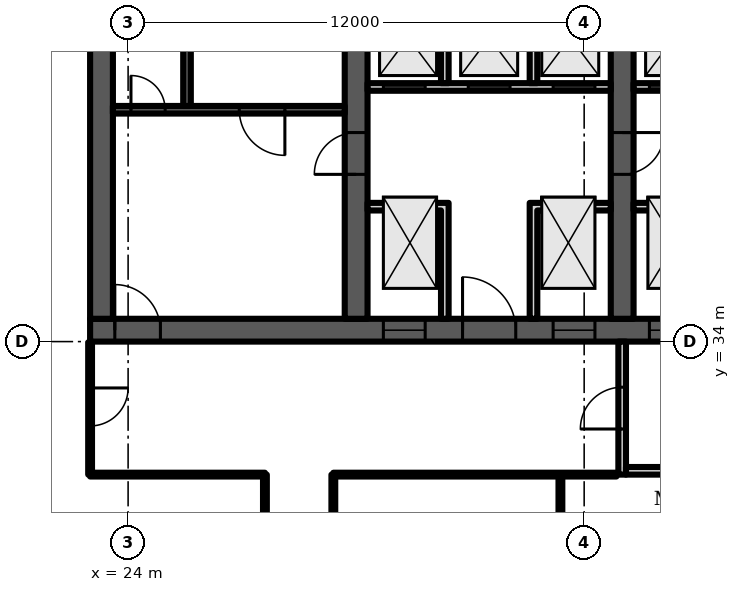
"""IFC4 building model, lengths in metres.
Left out: names, types, materials, properties, quantities, classifications, styles, units other than length and angle.
Written with IfcOpenShell. Run it as: python <this file> out.ifc"""

import sys

from ifc_helpers import new_model, si_unit, direction, frame, frame_2d, origin, place, context, subcontext, project, spatial, polyline, rectangle, outline, extrude, element, fill, save


model = new_model("IFC4")
c1 = context("Model", 3, precision=1e-05, world=origin(), true_north=direction((0.0, 1.0)))
c2 = subcontext(c1, "Body", "Model", "MODEL_VIEW")
j1 = project(units=[si_unit("LENGTHUNIT", "METRE"), si_unit("PLANEANGLEUNIT", "RADIAN")], contexts=[c1])
p1 = place(None, origin())
s1 = spatial("IfcSite", under=j1, at=p1, CompositionType="ELEMENT")
p2 = place(p1, origin())
s2 = spatial("IfcBuilding", under=s1, at=p2, CompositionType="ELEMENT")
p3 = place(p2, frame((0.0, 0.0, 207.1)))
s3 = spatial("IfcBuildingStorey", under=s2, at=p3, CompositionType="ELEMENT", Elevation=207.1)
p4 = place(p3, frame((23.0, 34.3, 0.0), z_axis=(0.0, 0.0, 1.0), x_axis=(1.0, 0.0, 0.0)))
e1 = element("IfcWall", 1, at=p4, inside=s3, PredefinedType="SHEAR", context=c2, shape_type="SweptSolid", body=[
    extrude(rectangle(XDim=35.0, YDim=0.6, at=frame_2d((17.5, 0.0))), origin(), (0.0, 0.0, 1.0), 3.6),
])
p5 = place(p4, frame((0.65, 0.0, 0.0)))
e2 = element("IfcOpeningElement", 2, at=p5, cuts=e1, PredefinedType="OPENING", context=c2, shape_type="SweptSolid", body=[
    extrude(rectangle(XDim=1.2, YDim=2.1, at=frame_2d((0.6, 1.05))), frame((0.0, 0.31, 0.0), z_axis=(0.0, -1.0, 0.0), x_axis=(1.0, 0.0, 0.0)), (0.0, 0.0, 1.0), 0.62),
])
p6 = place(p4, frame((7.717, 0.0, 0.0)))
e3 = element("IfcOpeningElement", 3, at=p6, cuts=e1, PredefinedType="OPENING", context=c2, shape_type="SweptSolid", body=[
    extrude(rectangle(XDim=1.1, YDim=2.1, at=frame_2d((0.55, 1.05))), frame((0.0, 0.31, 0.0), z_axis=(0.0, -1.0, 0.0), x_axis=(1.0, 0.0, 0.0)), (0.0, 0.0, 1.0), 0.62),
])
p7 = place(p4, frame((12.183, 0.0, 0.0)))
e4 = element("IfcOpeningElement", 4, at=p7, cuts=e1, PredefinedType="OPENING", context=c2, shape_type="SweptSolid", body=[
    extrude(rectangle(XDim=1.1, YDim=2.1, at=frame_2d((0.55, 1.05))), frame((0.0, 0.31, 0.0), z_axis=(0.0, -1.0, 0.0), x_axis=(1.0, 0.0, 0.0)), (0.0, 0.0, 1.0), 0.62),
])
p8 = place(p4, frame((9.8, 0.0, 0.0)))
e5 = element("IfcOpeningElement", 5, at=p8, cuts=e1, PredefinedType="OPENING", context=c2, shape_type="SweptSolid", body=[
    extrude(rectangle(XDim=1.4, YDim=2.1, at=frame_2d((0.7, 1.05))), frame((0.0, 0.31, 0.0), z_axis=(0.0, -1.0, 0.0), x_axis=(1.0, 0.0, 0.0)), (0.0, 0.0, 1.0), 0.62),
])
p9 = place(p4, frame((14.717, 0.0, 0.0)))
e6 = element("IfcOpeningElement", 6, at=p9, cuts=e1, PredefinedType="OPENING", context=c2, shape_type="SweptSolid", body=[
    extrude(rectangle(XDim=1.1, YDim=2.1, at=frame_2d((0.55, 1.05))), frame((0.0, 0.31, 0.0), z_axis=(0.0, -1.0, 0.0), x_axis=(1.0, 0.0, 0.0)), (0.0, 0.0, 1.0), 0.62),
])
p10 = place(p4, frame((16.95, 0.0, 0.0)))
e7 = element("IfcOpeningElement", 7, at=p10, cuts=e1, PredefinedType="OPENING", context=c2, shape_type="SweptSolid", body=[
    extrude(rectangle(XDim=1.1, YDim=2.1, at=frame_2d((0.55, 1.05))), frame((0.0, 0.31, 0.0), z_axis=(0.0, -1.0, 0.0), x_axis=(1.0, 0.0, 0.0)), (0.0, 0.0, 1.0), 0.62),
])
p11 = place(p4, frame((19.183, 0.0, 0.0)))
e8 = element("IfcOpeningElement", 8, at=p11, cuts=e1, PredefinedType="OPENING", context=c2, shape_type="SweptSolid", body=[
    extrude(rectangle(XDim=1.1, YDim=2.1, at=frame_2d((0.55, 1.05))), frame((0.0, 0.31, 0.0), z_axis=(0.0, -1.0, 0.0), x_axis=(1.0, 0.0, 0.0)), (0.0, 0.0, 1.0), 0.62),
])
p12 = place(p4, frame((26.15, 0.0, 0.0)))
e9 = element("IfcOpeningElement", 9, at=p12, cuts=e1, PredefinedType="OPENING", context=c2, shape_type="SweptSolid", body=[
    extrude(rectangle(XDim=1.2, YDim=2.1, at=frame_2d((0.6, 1.05))), frame((0.0, 0.31, 0.0), z_axis=(0.0, -1.0, 0.0), x_axis=(1.0, 0.0, 0.0)), (0.0, 0.0, 1.0), 0.62),
])
p13 = place(p4, frame((28.767, 0.0, 0.0)))
e10 = element("IfcOpeningElement", 10, at=p13, cuts=e1, PredefinedType="OPENING", context=c2, shape_type="SweptSolid", body=[
    extrude(rectangle(XDim=1.0, YDim=2.1, at=frame_2d((0.5, 1.05))), frame((0.0, 0.31, 0.0), z_axis=(0.0, -1.0, 0.0), x_axis=(1.0, 0.0, 0.0)), (0.0, 0.0, 1.0), 0.62),
])
p14 = place(p4, frame((33.083, 0.0, 0.0)))
e11 = element("IfcOpeningElement", 11, at=p14, cuts=e1, PredefinedType="OPENING", context=c2, shape_type="SweptSolid", body=[
    extrude(rectangle(XDim=1.0, YDim=2.1, at=frame_2d((0.5, 1.05))), frame((0.0, 0.31, 0.0), z_axis=(0.0, -1.0, 0.0), x_axis=(1.0, 0.0, 0.0)), (0.0, 0.0, 1.0), 0.62),
])
p15 = place(p4, frame((30.8, 0.0, 0.0)))
e12 = element("IfcOpeningElement", 12, at=p15, cuts=e1, PredefinedType="OPENING", context=c2, shape_type="SweptSolid", body=[
    extrude(rectangle(XDim=1.4, YDim=2.1, at=frame_2d((0.7, 1.05))), frame((0.0, 0.31, 0.0), z_axis=(0.0, -1.0, 0.0), x_axis=(1.0, 0.0, 0.0)), (0.0, 0.0, 1.0), 0.62),
])
p16 = place(p3, frame((23.3, 34.6, 0.0), z_axis=(0.0, 0.0, 1.0), x_axis=(0.0, 1.0, 0.0)))
e13 = element("IfcWall", 13, at=p16, inside=s3, PredefinedType="SHEAR", context=c2, shape_type="SweptSolid", body=[
    extrude(rectangle(XDim=13.585, YDim=0.6, at=frame_2d((6.792, 0.0))), origin(), (0.0, 0.0, 1.0), 3.6),
])
p17 = place(p3, frame((30.0, 34.6, 0.0), z_axis=(0.0, 0.0, 1.0), x_axis=(0.0, 1.0, 0.0)))
e14 = element("IfcWall", 14, at=p17, inside=s3, PredefinedType="SHEAR", context=c2, shape_type="SweptSolid", body=[
    extrude(rectangle(XDim=14.171, YDim=0.6, at=frame_2d((7.085, 0.0))), origin(), (0.0, 0.0, 1.0), 3.6),
])
p18 = place(p17, frame((3.8, 0.0, 0.0)))
e15 = element("IfcOpeningElement", 15, at=p18, cuts=e14, PredefinedType="OPENING", context=c2, shape_type="SweptSolid", body=[
    extrude(rectangle(XDim=1.1, YDim=2.1, at=frame_2d((0.55, 1.05))), frame((0.0, 0.31, 0.0), z_axis=(0.0, -1.0, 0.0), x_axis=(1.0, 0.0, 0.0)), (0.0, 0.0, 1.0), 0.62),
])
p19 = place(p3, frame((37.0, 34.6, 0.0), z_axis=(0.0, 0.0, 1.0), x_axis=(0.0, 1.0, 0.0)))
e16 = element("IfcWall", 16, at=p19, inside=s3, PredefinedType="SHEAR", context=c2, shape_type="SweptSolid", body=[
    extrude(rectangle(XDim=14.784, YDim=0.6, at=frame_2d((7.392, 0.0))), origin(), (0.0, 0.0, 1.0), 3.6),
])
p20 = place(p19, frame((11.302, 0.0, 0.0)))
e17 = element("IfcOpeningElement", 17, at=p20, cuts=e16, PredefinedType="OPENING", context=c2, shape_type="SweptSolid", body=[
    extrude(rectangle(XDim=1.0, YDim=2.1, at=frame_2d((0.5, 1.05))), frame((0.0, 0.31, 0.0), z_axis=(0.0, -1.0, 0.0), x_axis=(1.0, 0.0, 0.0)), (0.0, 0.0, 1.0), 0.62),
])
p21 = place(p19, frame((3.8, 0.0, 0.0)))
e18 = element("IfcOpeningElement", 18, at=p21, cuts=e16, PredefinedType="OPENING", context=c2, shape_type="SweptSolid", body=[
    extrude(rectangle(XDim=1.1, YDim=2.1, at=frame_2d((0.55, 1.05))), frame((0.0, 0.31, 0.0), z_axis=(0.0, -1.0, 0.0), x_axis=(1.0, 0.0, 0.0)), (0.0, 0.0, 1.0), 0.62),
])
p22 = place(p3, frame((23.6, 40.1, 0.0), z_axis=(0.0, 0.0, 1.0), x_axis=(1.0, 0.0, 0.0)))
e19 = element("IfcWall", 19, at=p22, inside=s3, PredefinedType="SHEAR", context=c2, shape_type="SweptSolid", body=[
    extrude(rectangle(XDim=6.1, YDim=0.2, at=frame_2d((3.05, 0.0))), origin(), (0.0, 0.0, 1.0), 3.2),
])
p23 = place(p22, frame((3.325, 0.0, 0.0)))
e20 = element("IfcOpeningElement", 20, at=p23, cuts=e19, PredefinedType="OPENING", context=c2, shape_type="SweptSolid", body=[
    extrude(rectangle(XDim=1.2, YDim=2.1, at=frame_2d((0.6, 1.05))), frame((0.0, 0.11, 0.0), z_axis=(0.0, -1.0, 0.0), x_axis=(1.0, 0.0, 0.0)), (0.0, 0.0, 1.0), 0.22),
])
p24 = place(p22, frame((0.475, 0.0, 0.0)))
e21 = element("IfcOpeningElement", 21, at=p24, cuts=e19, PredefinedType="OPENING", context=c2, shape_type="SweptSolid", body=[
    extrude(rectangle(XDim=0.9, YDim=2.1, at=frame_2d((0.45, 1.05))), frame((0.0, 0.11, 0.0), z_axis=(0.0, -1.0, 0.0), x_axis=(1.0, 0.0, 0.0)), (0.0, 0.0, 1.0), 0.22),
])
p25 = place(p3, frame((25.55, 40.2, 0.0), z_axis=(0.0, 0.0, 1.0), x_axis=(0.0, 1.0, 0.0)))
e22 = element("IfcWall", 22, at=p25, inside=s3, PredefinedType="SHEAR", context=c2, shape_type="SweptSolid", body=[
    extrude(rectangle(XDim=7.2, YDim=0.2, at=frame_2d((3.6, 0.0))), origin(), (0.0, 0.0, 1.0), 3.2),
])
p26 = place(p3, frame((30.3, 40.7, 0.0), z_axis=(0.0, 0.0, 1.0), x_axis=(1.0, 0.0, 0.0)))
e23 = element("IfcWall", 23, at=p26, inside=s3, PredefinedType="PARTITIONING", context=c2, shape_type="SweptSolid", body=[
    extrude(rectangle(XDim=6.4, YDim=0.2, at=frame_2d((3.2, 0.0))), origin(), (0.0, 0.0, 1.0), 3.2),
])
p27 = place(p26, frame((0.417, 0.0, 0.0)))
e24 = element("IfcOpeningElement", 24, at=p27, cuts=e23, PredefinedType="OPENING", context=c2, shape_type="SweptSolid", body=[
    extrude(rectangle(XDim=1.1, YDim=2.1, at=frame_2d((0.55, 1.05))), frame((0.0, 0.11, 0.0), z_axis=(0.0, -1.0, 0.0), x_axis=(1.0, 0.0, 0.0)), (0.0, 0.0, 1.0), 0.22),
])
p28 = place(p26, frame((2.65, 0.0, 0.0)))
e25 = element("IfcOpeningElement", 25, at=p28, cuts=e23, PredefinedType="OPENING", context=c2, shape_type="SweptSolid", body=[
    extrude(rectangle(XDim=1.1, YDim=2.1, at=frame_2d((0.55, 1.05))), frame((0.0, 0.11, 0.0), z_axis=(0.0, -1.0, 0.0), x_axis=(1.0, 0.0, 0.0)), (0.0, 0.0, 1.0), 0.22),
])
p29 = place(p26, frame((4.883, 0.0, 0.0)))
e26 = element("IfcOpeningElement", 26, at=p29, cuts=e23, PredefinedType="OPENING", context=c2, shape_type="SweptSolid", body=[
    extrude(rectangle(XDim=1.1, YDim=2.1, at=frame_2d((0.55, 1.05))), frame((0.0, 0.11, 0.0), z_axis=(0.0, -1.0, 0.0), x_axis=(1.0, 0.0, 0.0)), (0.0, 0.0, 1.0), 0.22),
])
p30 = place(p3, frame((0.0, 0.0, -0.0)))
e27 = element("IfcWall", 27, at=p30, inside=s3, PredefinedType="PARTITIONING", context=c2, shape_type="SweptSolid", body=[
    extrude(outline(polyline([(32.233, 37.45), (30.3, 37.45), (30.3, 37.65), (32.233, 37.65), (32.433, 37.65), (32.433, 34.6), (32.233, 34.6), (32.233, 37.45)])), origin(), (0.0, 0.0, 1.0), 3.2),
])
p31 = place(p3, frame((0.0, 0.0, -0.0)))
e28 = element("IfcWall", 28, at=p31, inside=s3, PredefinedType="PARTITIONING", context=c2, shape_type="SweptSolid", body=[
    extrude(outline(polyline([(34.567, 37.65), (34.767, 37.65), (36.7, 37.65), (36.7, 37.45), (34.767, 37.45), (34.767, 34.6), (34.567, 34.6), (34.567, 37.65)])), origin(), (0.0, 0.0, 1.0), 3.2),
])
p32 = place(p3, frame((0.0, 0.0, -0.0)))
e29 = element("IfcWall", 29, at=p32, inside=s3, PredefinedType="PARTITIONING", context=c2, shape_type="SweptSolid", body=[
    extrude(outline(polyline([(32.433, 40.8), (32.233, 40.8), (32.233, 43.8), (30.3, 43.8), (30.3, 44.0), (36.7, 44.0), (36.7, 43.8), (34.767, 43.8), (34.767, 40.8), (34.567, 40.8), (34.567, 43.8), (32.433, 43.8), (32.433, 40.8)])), origin(), (0.0, 0.0, 1.0), 3.2),
])
p33 = place(p3, frame((37.3, 40.7, 0.0), z_axis=(0.0, 0.0, 1.0), x_axis=(1.0, 0.0, 0.0)))
e30 = element("IfcWall", 30, at=p33, inside=s3, PredefinedType="PARTITIONING", context=c2, shape_type="SweptSolid", body=[
    extrude(rectangle(XDim=6.4, YDim=0.2, at=frame_2d((3.2, 0.0))), origin(), (0.0, 0.0, 1.0), 3.2),
])
p34 = place(p33, frame((0.417, 0.0, 0.0)))
e31 = element("IfcOpeningElement", 31, at=p34, cuts=e30, PredefinedType="OPENING", context=c2, shape_type="SweptSolid", body=[
    extrude(rectangle(XDim=1.1, YDim=2.1, at=frame_2d((0.55, 1.05))), frame((0.0, 0.11, 0.0), z_axis=(0.0, -1.0, 0.0), x_axis=(1.0, 0.0, 0.0)), (0.0, 0.0, 1.0), 0.22),
])
p35 = place(p33, frame((2.65, 0.0, 0.0)))
e32 = element("IfcOpeningElement", 32, at=p35, cuts=e30, PredefinedType="OPENING", context=c2, shape_type="SweptSolid", body=[
    extrude(rectangle(XDim=1.1, YDim=2.1, at=frame_2d((0.55, 1.05))), frame((0.0, 0.11, 0.0), z_axis=(0.0, -1.0, 0.0), x_axis=(1.0, 0.0, 0.0)), (0.0, 0.0, 1.0), 0.22),
])
p36 = place(p33, frame((4.883, 0.0, 0.0)))
e33 = element("IfcOpeningElement", 33, at=p36, cuts=e30, PredefinedType="OPENING", context=c2, shape_type="SweptSolid", body=[
    extrude(rectangle(XDim=1.1, YDim=2.1, at=frame_2d((0.55, 1.05))), frame((0.0, 0.11, 0.0), z_axis=(0.0, -1.0, 0.0), x_axis=(1.0, 0.0, 0.0)), (0.0, 0.0, 1.0), 0.22),
])
p37 = place(p3, frame((0.0, 0.0, -0.0)))
e34 = element("IfcWall", 34, at=p37, inside=s3, PredefinedType="PARTITIONING", context=c2, shape_type="SweptSolid", body=[
    extrude(outline(polyline([(41.567, 37.1), (39.433, 37.1), (39.433, 34.6), (39.233, 34.6), (39.233, 37.45), (37.3, 37.45), (37.3, 37.65), (39.233, 37.65), (39.433, 37.65), (39.433, 37.3), (41.567, 37.3), (41.567, 37.35), (41.767, 37.35), (43.7, 37.35), (43.7, 37.15), (41.767, 37.15), (41.767, 34.6), (41.567, 34.6), (41.567, 37.1)])), origin(), (0.0, 0.0, 1.0), 3.2),
])
p38 = place(p3, frame((0.0, 0.0, -0.0)))
e35 = element("IfcWall", 35, at=p38, inside=s3, PredefinedType="PARTITIONING", context=c2, shape_type="SweptSolid", body=[
    extrude(outline(polyline([(39.433, 40.8), (39.233, 40.8), (39.233, 43.8), (37.3, 43.8), (37.3, 44.0), (43.7, 44.0), (43.7, 43.8), (41.767, 43.8), (41.767, 40.8), (41.567, 40.8), (41.567, 43.8), (39.433, 43.8), (39.433, 40.8)])), origin(), (0.0, 0.0, 1.0), 3.2),
])
p39 = place(p3, frame((37.0, 30.5, 0.0), z_axis=(0.0, 0.0, 1.0), x_axis=(0.0, 1.0, 0.0)))
e36 = element("IfcWall", 36, at=p39, inside=s3, PredefinedType="PARTITIONING", context=c2, shape_type="SweptSolid", body=[
    extrude(rectangle(XDim=3.5, YDim=0.2, at=frame_2d((1.75, 0.0))), origin(), (0.0, 0.0, 1.0), 3.2),
])
p40 = place(p39, frame((1.2, 0.0, 0.0)))
e37 = element("IfcOpeningElement", 37, at=p40, cuts=e36, PredefinedType="OPENING", context=c2, shape_type="SweptSolid", body=[
    extrude(rectangle(XDim=1.1, YDim=2.1, at=frame_2d((0.55, 1.05))), frame((0.0, 0.11, 0.0), z_axis=(0.0, -1.0, 0.0), x_axis=(1.0, 0.0, 0.0)), (0.0, 0.0, 1.0), 0.22),
])
p41 = place(p3, frame((37.1, 30.6, 0.0), z_axis=(0.0, 0.0, 1.0), x_axis=(1.0, 0.0, 0.0)))
e38 = element("IfcWall", 38, at=p41, inside=s3, PredefinedType="PARTITIONING", context=c2, shape_type="SweptSolid", body=[
    extrude(rectangle(XDim=2.8, YDim=0.2, at=frame_2d((1.4, 0.0))), origin(), (0.0, 0.0, 1.0), 3.2),
])
p42 = place(p3, frame((23.0, 30.5, 0.0), z_axis=(0.0, 0.0, 1.0), x_axis=(0.0, 1.0, 0.0)))
e39 = element("IfcWall", 39, at=p42, inside=s3, PredefinedType="PARTITIONING", context=c2, shape_type="SweptSolid", body=[
    extrude(rectangle(XDim=3.48, YDim=0.1, at=frame_2d((1.74, 0.0))), origin(), (0.0, 0.0, 1.0), 3.2),
])
p43 = place(p42, frame((1.28, 0.0, 0.0)))
e40 = element("IfcOpeningElement", 40, at=p43, cuts=e39, PredefinedType="OPENING", context=c2, shape_type="SweptSolid", body=[
    extrude(rectangle(XDim=1.0, YDim=2.1, at=frame_2d((0.5, 1.05))), frame((0.0, 0.06, 0.0), z_axis=(0.0, -1.0, 0.0), x_axis=(1.0, 0.0, 0.0)), (0.0, 0.0, 1.0), 0.12),
])
p44 = place(p3, frame((23.0, 30.5, 0.0), z_axis=(0.0, 0.0, 1.0), x_axis=(1.0, 0.0, 0.0)))
e41 = element("IfcWall", 41, at=p44, inside=s3, PredefinedType="PARTITIONING", context=c2, shape_type="SweptSolid", body=[
    extrude(rectangle(XDim=4.6, YDim=0.1, at=frame_2d((2.3, 0.0))), origin(), (0.0, 0.0, 1.0), 3.2),
])
p45 = place(p3, frame((27.6, 23.9, 0.0), z_axis=(0.0, 0.0, 1.0), x_axis=(0.0, 1.0, 0.0)))
e42 = element("IfcWall", 42, at=p45, inside=s3, PredefinedType="PARTITIONING", context=c2, shape_type="SweptSolid", body=[
    extrude(rectangle(XDim=6.6, YDim=0.1, at=frame_2d((3.3, 0.0))), origin(), (0.0, 0.0, 1.0), 3.2),
])
p46 = place(p3, frame((29.4, 22.1, 0.0), z_axis=(0.0, 0.0, 1.0), x_axis=(0.0, 1.0, 0.0)))
e43 = element("IfcWall", 43, at=p46, inside=s3, PredefinedType="PARTITIONING", context=c2, shape_type="SweptSolid", body=[
    extrude(rectangle(XDim=8.4, YDim=0.1, at=frame_2d((4.2, 0.0))), origin(), (0.0, 0.0, 1.0), 3.2),
])
p47 = place(p3, frame((29.4, 30.5, 0.0), z_axis=(0.0, 0.0, 1.0), x_axis=(1.0, 0.0, 0.0)))
e44 = element("IfcWall", 44, at=p47, inside=s3, PredefinedType="PARTITIONING", context=c2, shape_type="SweptSolid", body=[
    extrude(rectangle(XDim=7.45, YDim=0.1, at=frame_2d((3.725, 0.0))), origin(), (0.0, 0.0, 1.0), 3.2),
])
p48 = place(p3, frame((35.375, 19.205, 0.0), z_axis=(0.0, 0.0, 1.0), x_axis=(0.0, 1.0, 0.0)))
e45 = element("IfcWall", 45, at=p48, inside=s3, PredefinedType="PARTITIONING", context=c2, shape_type="SweptSolid", body=[
    extrude(rectangle(XDim=11.295, YDim=0.1, at=frame_2d((5.647, 0.0))), origin(), (0.0, 0.0, 1.0), 3.2),
])
p49 = place(p23, origin())
e46 = element("IfcDoor", 46, at=p49, inside=s3, OperationType="SINGLE_SWING_RIGHT", PredefinedType="DOOR", context=c2, shape_type="SweptSolid", body=[
    extrude(rectangle(XDim=1.2, YDim=2.1, at=frame_2d((0.6, 1.05))), frame((0.0, 0.025, 0.0), z_axis=(0.0, -1.0, 0.0), x_axis=(1.0, 0.0, 0.0)), (0.0, 0.0, 1.0), 0.05),
])
fill(e20, e46)
p50 = place(p24, origin())
e47 = element("IfcDoor", 47, at=p50, inside=s3, OperationType="SINGLE_SWING_LEFT", PredefinedType="DOOR", context=c2, shape_type="SweptSolid", body=[
    extrude(rectangle(XDim=0.9, YDim=2.1, at=frame_2d((0.45, 1.05))), frame((0.0, 0.025, 0.0), z_axis=(0.0, -1.0, 0.0), x_axis=(1.0, 0.0, 0.0)), (0.0, 0.0, 1.0), 0.05),
])
fill(e21, e47)
p51 = place(p5, origin())
e48 = element("IfcDoor", 48, at=p51, inside=s3, OperationType="SINGLE_SWING_LEFT", PredefinedType="DOOR", context=c2, shape_type="SweptSolid", body=[
    extrude(rectangle(XDim=1.2, YDim=2.1, at=frame_2d((0.6, 1.05))), frame((0.0, 0.025, 0.0), z_axis=(0.0, -1.0, 0.0), x_axis=(1.0, 0.0, 0.0)), (0.0, 0.0, 1.0), 0.05),
])
fill(e2, e48)
p52 = place(p6, origin())
e49 = element("IfcDoor", 49, at=p52, inside=s3, OperationType="DOUBLE_DOOR_SLIDING", PredefinedType="DOOR", context=c2, shape_type="SweptSolid", body=[
    extrude(rectangle(XDim=1.1, YDim=2.1, at=frame_2d((0.55, 1.05))), frame((0.0, 0.025, 0.0), z_axis=(0.0, -1.0, 0.0), x_axis=(1.0, 0.0, 0.0)), (0.0, 0.0, 1.0), 0.05),
])
fill(e3, e49)
p53 = place(p7, origin())
e50 = element("IfcDoor", 50, at=p53, inside=s3, OperationType="DOUBLE_DOOR_SLIDING", PredefinedType="DOOR", context=c2, shape_type="SweptSolid", body=[
    extrude(rectangle(XDim=1.1, YDim=2.1, at=frame_2d((0.55, 1.05))), frame((0.0, 0.025, 0.0), z_axis=(0.0, -1.0, 0.0), x_axis=(1.0, 0.0, 0.0)), (0.0, 0.0, 1.0), 0.05),
])
fill(e4, e50)
p54 = place(p8, origin())
e51 = element("IfcDoor", 51, at=p54, inside=s3, OperationType="DOUBLE_DOOR_SINGLE_SWING", PredefinedType="DOOR", context=c2, shape_type="SweptSolid", body=[
    extrude(rectangle(XDim=1.4, YDim=2.1, at=frame_2d((0.7, 1.05))), frame((0.0, 0.025, 0.0), z_axis=(0.0, -1.0, 0.0), x_axis=(1.0, 0.0, 0.0)), (0.0, 0.0, 1.0), 0.05),
])
fill(e5, e51)
p55 = place(p27, origin())
e52 = element("IfcDoor", 52, at=p55, inside=s3, OperationType="DOUBLE_DOOR_SLIDING", PredefinedType="DOOR", context=c2, shape_type="SweptSolid", body=[
    extrude(rectangle(XDim=1.1, YDim=2.1, at=frame_2d((0.55, 1.05))), frame((0.0, 0.025, 0.0), z_axis=(0.0, -1.0, 0.0), x_axis=(1.0, 0.0, 0.0)), (0.0, 0.0, 1.0), 0.05),
])
fill(e24, e52)
p56 = place(p28, origin())
e53 = element("IfcDoor", 53, at=p56, inside=s3, OperationType="DOUBLE_DOOR_SLIDING", PredefinedType="DOOR", context=c2, shape_type="SweptSolid", body=[
    extrude(rectangle(XDim=1.1, YDim=2.1, at=frame_2d((0.55, 1.05))), frame((0.0, 0.025, 0.0), z_axis=(0.0, -1.0, 0.0), x_axis=(1.0, 0.0, 0.0)), (0.0, 0.0, 1.0), 0.05),
])
fill(e25, e53)
p57 = place(p29, origin())
e54 = element("IfcDoor", 54, at=p57, inside=s3, OperationType="DOUBLE_DOOR_SLIDING", PredefinedType="DOOR", context=c2, shape_type="SweptSolid", body=[
    extrude(rectangle(XDim=1.1, YDim=2.1, at=frame_2d((0.55, 1.05))), frame((0.0, 0.025, 0.0), z_axis=(0.0, -1.0, 0.0), x_axis=(1.0, 0.0, 0.0)), (0.0, 0.0, 1.0), 0.05),
])
fill(e26, e54)
p58 = place(p9, origin())
e55 = element("IfcDoor", 55, at=p58, inside=s3, OperationType="DOUBLE_DOOR_SLIDING", PredefinedType="DOOR", context=c2, shape_type="SweptSolid", body=[
    extrude(rectangle(XDim=1.1, YDim=2.1, at=frame_2d((0.55, 1.05))), frame((0.0, 0.025, 0.0), z_axis=(0.0, -1.0, 0.0), x_axis=(1.0, 0.0, 0.0)), (0.0, 0.0, 1.0), 0.05),
])
fill(e6, e55)
p59 = place(p34, origin())
e56 = element("IfcDoor", 56, at=p59, inside=s3, OperationType="DOUBLE_DOOR_SLIDING", PredefinedType="DOOR", context=c2, shape_type="SweptSolid", body=[
    extrude(rectangle(XDim=1.1, YDim=2.1, at=frame_2d((0.55, 1.05))), frame((0.0, 0.025, 0.0), z_axis=(0.0, -1.0, 0.0), x_axis=(1.0, 0.0, 0.0)), (0.0, 0.0, 1.0), 0.05),
])
fill(e31, e56)
p60 = place(p18, origin())
e57 = element("IfcDoor", 57, at=p60, inside=s3, OperationType="SINGLE_SWING_LEFT", PredefinedType="DOOR", context=c2, shape_type="SweptSolid", body=[
    extrude(rectangle(XDim=1.1, YDim=2.1, at=frame_2d((0.55, 1.05))), frame((0.0, 0.025, 0.0), z_axis=(0.0, -1.0, 0.0), x_axis=(1.0, 0.0, 0.0)), (0.0, 0.0, 1.0), 0.05),
])
fill(e15, e57)
p61 = place(p21, origin())
e58 = element("IfcDoor", 58, at=p61, inside=s3, OperationType="SINGLE_SWING_RIGHT", PredefinedType="DOOR", context=c2, shape_type="SweptSolid", body=[
    extrude(rectangle(XDim=1.1, YDim=2.1, at=frame_2d((0.55, 1.05))), frame((0.0, 0.025, 0.0), z_axis=(0.0, -1.0, 0.0), x_axis=(1.0, 0.0, 0.0)), (0.0, 0.0, 1.0), 0.05),
])
fill(e18, e58)
p62 = place(p40, origin())
e59 = element("IfcDoor", 59, at=p62, inside=s3, OperationType="SINGLE_SWING_LEFT", PredefinedType="DOOR", context=c2, shape_type="SweptSolid", body=[
    extrude(rectangle(XDim=1.1, YDim=2.1, at=frame_2d((0.55, 1.05))), frame((0.0, 0.025, 0.0), z_axis=(0.0, -1.0, 0.0), x_axis=(1.0, 0.0, 0.0)), (0.0, 0.0, 1.0), 0.05),
])
fill(e37, e59)
p63 = place(p43, origin())
e60 = element("IfcDoor", 60, at=p63, inside=s3, OperationType="SINGLE_SWING_RIGHT", PredefinedType="DOOR", context=c2, shape_type="SweptSolid", body=[
    extrude(rectangle(XDim=1.0, YDim=2.1, at=frame_2d((0.5, 1.05))), frame((0.0, 0.025, 0.0), z_axis=(0.0, -1.0, 0.0), x_axis=(1.0, 0.0, 0.0)), (0.0, 0.0, 1.0), 0.05),
])
fill(e40, e60)
save(model, sys.argv[1])
